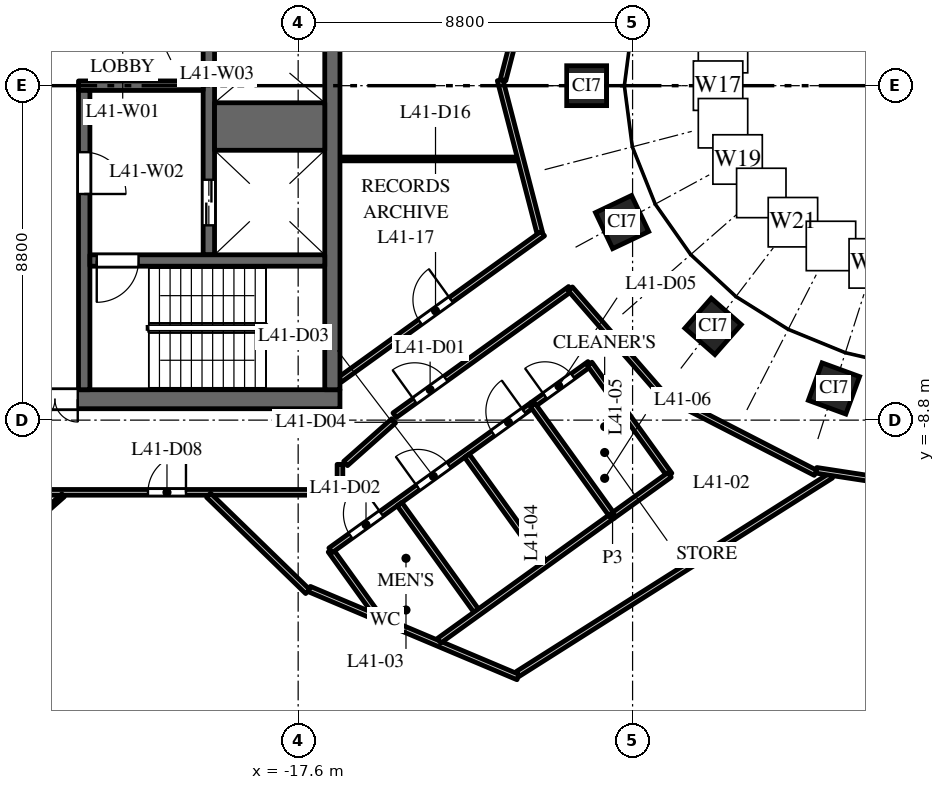
"""IFC4 building model, lengths in metres.
Left out: names, types, materials, properties, quantities, classifications, styles, units other than length and angle.
Written with IfcOpenShell. Run it as: python <this file> out.ifc"""

import sys

from ifc_helpers import new_model, si_unit, direction, frame, frame_2d, origin, origin_2d, place, context, subcontext, project, spatial, rectangle, extrude, element, fill, save


model = new_model("IFC4")
c1 = context("Model", 3, precision=1e-05, world=origin(), true_north=direction((0.0, 1.0)))
c2 = subcontext(c1, "Body", "Model", "MODEL_VIEW")
j1 = project(units=[si_unit("LENGTHUNIT", "METRE"), si_unit("PLANEANGLEUNIT", "RADIAN")], contexts=[c1])
p1 = place(None, origin())
s1 = spatial("IfcSite", under=j1, at=p1, CompositionType="ELEMENT")
p2 = place(p1, origin())
s2 = spatial("IfcBuilding", under=s1, at=p2, CompositionType="ELEMENT")
p3 = place(p2, frame((0.0, 0.0, 178.0)))
s3 = spatial("IfcBuildingStorey", under=s2, at=p3, CompositionType="ELEMENT", Elevation=178.0)
for number, where, z_axis, x_axis in (
    (1, (-10.008, 0.0, 0.0), (0.0, 0.0, 1.0), (0.0, -1.0, 0.0)),
    (2, (-9.076, -3.588, 0.0), (0.0, 0.0, 1.0), (0.429, -0.903, 0.0)),
    (3, (-6.682, -6.334, 0.0), (0.0, 0.0, 1.0), (0.751, -0.66, 0.0)),
    (4, (-3.501, -7.967, 0.0), (0.0, 0.0, 1.0), (0.939, -0.344, 0.0)),
):
    element("IfcColumn", number, at=place(p3, frame(where, z_axis=z_axis, x_axis=x_axis)), inside=s3, PredefinedType="COLUMN", context=c2, shape_type="SweptSolid", body=[
        extrude(rectangle(XDim=1.05, YDim=1.05, at=origin_2d()), origin(), (0.0, 0.0, 1.0), 4.0),
    ])
p4 = place(p3, frame((-16.5, -8.25, 0.0), z_axis=(0.0, 0.0, 1.0), x_axis=(-1.0, 0.0, 0.0)))
e5 = element("IfcWall", 5, at=p4, inside=s3, PredefinedType="SHEAR", context=c2, shape_type="SweptSolid", body=[
    extrude(rectangle(XDim=15.0, YDim=0.5, at=frame_2d((7.5, 0.0))), origin(), (0.0, 0.0, 1.0), 3.7),
])
p5 = place(p4, frame((6.9, 0.0, 0.0)))
e6 = element("IfcOpeningElement", 6, at=p5, cuts=e5, PredefinedType="OPENING", context=c2, shape_type="SweptSolid", body=[
    extrude(rectangle(XDim=1.2, YDim=2.1, at=frame_2d((0.6, 1.05))), frame((0.0, 0.26, 0.0), z_axis=(0.0, -1.0, 0.0), x_axis=(1.0, 0.0, 0.0)), (0.0, 0.0, 1.0), 0.52),
])
p6 = place(p4, frame((12.95, 0.0, 0.0)))
e7 = element("IfcOpeningElement", 7, at=p6, cuts=e5, PredefinedType="OPENING", context=c2, shape_type="SweptSolid", body=[
    extrude(rectangle(XDim=0.9, YDim=2.1, at=frame_2d((0.45, 1.05))), frame((0.0, 0.26, 0.0), z_axis=(0.0, -1.0, 0.0), x_axis=(1.0, 0.0, 0.0)), (0.0, 0.0, 1.0), 0.52),
])
p7 = place(p3, frame((-19.95, -4.45, 0.0), z_axis=(0.0, 0.0, 1.0), x_axis=(0.0, 1.0, 0.0)))
e8 = element("IfcWall", 8, at=p7, inside=s3, PredefinedType="SHEAR", context=c2, shape_type="SweptSolid", body=[
    extrude(rectangle(XDim=8.9, YDim=0.3, at=frame_2d((4.45, 0.0))), origin(), (0.0, 0.0, 1.0), 3.7),
])
p8 = place(p7, frame((0.775, 0.0, 0.0)))
e9 = element("IfcOpeningElement", 9, at=p8, cuts=e8, PredefinedType="OPENING", context=c2, shape_type="SweptSolid", body=[
    extrude(rectangle(XDim=1.2, YDim=2.1, at=frame_2d((0.6, 1.05))), frame((0.0, 0.16, 0.0), z_axis=(0.0, -1.0, 0.0), x_axis=(1.0, 0.0, 0.0)), (0.0, 0.0, 1.0), 0.32),
])
p9 = place(p7, frame((7.25, 0.0, 0.0)))
e10 = element("IfcOpeningElement", 10, at=p9, cuts=e8, PredefinedType="OPENING", context=c2, shape_type="SweptSolid", body=[
    extrude(rectangle(XDim=1.1, YDim=2.1, at=frame_2d((0.55, 1.05))), frame((0.0, 0.16, 0.0), z_axis=(0.0, -1.0, 0.0), x_axis=(1.0, 0.0, 0.0)), (0.0, 0.0, 1.0), 0.32),
])
p10 = place(p3, frame((-20.1, 0.0, 0.0), z_axis=(0.0, 0.0, 1.0), x_axis=(-1.0, 0.0, 0.0)))
e11 = element("IfcWall", 11, at=p10, inside=s3, PredefinedType="SHEAR", context=c2, shape_type="SweptSolid", body=[
    extrude(rectangle(XDim=3.28, YDim=0.25, at=frame_2d((1.64, 0.0))), origin(), (0.0, 0.0, 1.0), 3.7),
])
p11 = place(p3, frame((-16.7, -8.0, 0.0), z_axis=(0.0, 0.0, 1.0), x_axis=(0.0, 1.0, 0.0)))
e12 = element("IfcWall", 12, at=p11, inside=s3, PredefinedType="SHEAR", context=c2, shape_type="SweptSolid", body=[
    extrude(rectangle(XDim=16.0, YDim=0.4, at=frame_2d((8.0, 0.0))), origin(), (0.0, 0.0, 1.0), 3.7),
])
p12 = place(p3, frame((-16.9, -1.075, 0.0), z_axis=(0.0, 0.0, 1.0), x_axis=(-1.0, 0.0, 0.0)))
e13 = element("IfcWall", 13, at=p12, inside=s3, PredefinedType="SHEAR", context=c2, shape_type="SweptSolid", body=[
    extrude(rectangle(XDim=2.9, YDim=1.25, at=frame_2d((1.45, 0.0))), origin(), (0.0, 0.0, 1.0), 3.7),
])
p13 = place(p3, frame((-23.23, -8.0, 0.0), z_axis=(0.0, 0.0, 1.0), x_axis=(0.0, 1.0, 0.0)))
e14 = element("IfcWall", 14, at=p13, inside=s3, PredefinedType="SHEAR", context=c2, shape_type="SweptSolid", body=[
    extrude(rectangle(XDim=7.875, YDim=0.3, at=frame_2d((3.938, 0.0))), origin(), (0.0, 0.0, 1.0), 3.7),
])
p14 = place(p13, frame((5.15, 0.0, 0.0)))
e15 = element("IfcOpeningElement", 15, at=p14, cuts=e14, PredefinedType="OPENING", context=c2, shape_type="SweptSolid", body=[
    extrude(rectangle(XDim=1.1, YDim=2.1, at=frame_2d((0.55, 1.05))), frame((0.0, 0.16, 0.0), z_axis=(0.0, -1.0, 0.0), x_axis=(1.0, 0.0, 0.0)), (0.0, 0.0, 1.0), 0.32),
])
p15 = place(p3, frame((-16.9, -4.6, 0.0), z_axis=(0.0, 0.0, 1.0), x_axis=(-1.0, 0.0, 0.0)))
e16 = element("IfcWall", 16, at=p15, inside=s3, PredefinedType="SHEAR", context=c2, shape_type="SweptSolid", body=[
    extrude(rectangle(XDim=6.18, YDim=0.3, at=frame_2d((3.09, 0.0))), origin(), (0.0, 0.0, 1.0), 3.7),
])
p16 = place(p15, frame((4.9, 0.0, 0.0)))
e17 = element("IfcOpeningElement", 17, at=p16, cuts=e16, PredefinedType="OPENING", context=c2, shape_type="SweptSolid", body=[
    extrude(rectangle(XDim=1.1, YDim=2.1, at=frame_2d((0.55, 1.05))), frame((0.0, 0.16, 0.0), z_axis=(0.0, -1.0, 0.0), x_axis=(1.0, 0.0, 0.0)), (0.0, 0.0, 1.0), 0.32),
])
p17 = place(p3, frame((-31.5, -10.7, 0.0), z_axis=(0.0, 0.0, 1.0), x_axis=(1.0, 0.0, 0.0)))
e18 = element("IfcWall", 18, at=p17, inside=s3, PredefinedType="PARTITIONING", context=c2, shape_type="SweptSolid", body=[
    extrude(rectangle(XDim=15.0, YDim=0.15, at=frame_2d((7.5, 0.0))), origin(), (0.0, 0.0, 1.0), 3.1),
])
p18 = place(p17, frame((5.15, 0.0, 0.0)))
e19 = element("IfcOpeningElement", 19, at=p18, cuts=e18, PredefinedType="OPENING", context=c2, shape_type="SweptSolid", body=[
    extrude(rectangle(XDim=1.0, YDim=2.1, at=frame_2d((0.5, 1.05))), frame((0.0, 0.085, 0.0), z_axis=(0.0, -1.0, 0.0), x_axis=(1.0, 0.0, 0.0)), (0.0, 0.0, 1.0), 0.17),
])
p19 = place(p17, frame((9.948, 0.0, 0.0)))
e20 = element("IfcOpeningElement", 20, at=p19, cuts=e18, PredefinedType="OPENING", context=c2, shape_type="SweptSolid", body=[
    extrude(rectangle(XDim=1.0, YDim=2.1, at=frame_2d((0.5, 1.05))), frame((0.0, 0.085, 0.0), z_axis=(0.0, -1.0, 0.0), x_axis=(1.0, 0.0, 0.0)), (0.0, 0.0, 1.0), 0.17),
])
p20 = place(p3, frame((-29.569, -15.895, 0.0), z_axis=(0.0, 0.0, 1.0), x_axis=(0.748985701008, 0.662586160198, 0.0)))
e21 = element("IfcWall", 21, at=p20, inside=s3, PredefinedType="PARTITIONING", context=c2, shape_type="SweptSolid", body=[
    extrude(rectangle(XDim=7.723, YDim=0.1, at=frame_2d((3.861, 0.0))), origin(), (0.0, 0.0, 1.0), 2.9),
])
p21 = place(p3, frame((-19.957, -10.778, 0.0), z_axis=(0.0, 0.0, 1.0), x_axis=(0.717213172792, -0.696853833148, 0.0)))
e22 = element("IfcWall", 22, at=p21, inside=s3, PredefinedType="PARTITIONING", context=c2, shape_type="SweptSolid", body=[
    extrude(rectangle(XDim=3.634, YDim=0.15, at=frame_2d((1.817, 0.0))), origin(), (0.0, 0.0, 1.0), 2.75),
])
p22 = place(p3, frame((-17.308, -13.244, 0.0), z_axis=(0.0, 0.0, 1.0), x_axis=(0.921372407205, -0.388680958167, 0.0)))
e23 = element("IfcWall", 23, at=p22, inside=s3, PredefinedType="PARTITIONING", context=c2, shape_type="SweptSolid", body=[
    extrude(rectangle(XDim=5.964, YDim=0.15, at=frame_2d((2.982, 0.0))), origin(), (0.0, 0.0, 1.0), 2.85),
])
p23 = place(p3, frame((-16.748, -12.226, 0.0), z_axis=(0.0, 0.0, 1.0), x_axis=(0.584075144399, -0.811699590794, 0.0)))
e24 = element("IfcWall", 24, at=p23, inside=s3, PredefinedType="PARTITIONING", context=c2, shape_type="SweptSolid", body=[
    extrude(rectangle(XDim=2.073, YDim=0.15, at=frame_2d((1.037, 0.0))), origin(), (0.0, 0.0, 1.0), 3.7),
])
p24 = place(p3, frame((-16.748, -12.226, 0.0), z_axis=(0.0, 0.0, 1.0), x_axis=(0.811671429569, 0.584114278563, 0.0)))
e25 = element("IfcWall", 25, at=p24, inside=s3, PredefinedType="PARTITIONING", context=c2, shape_type="SweptSolid", body=[
    extrude(rectangle(XDim=6.552, YDim=0.15, at=frame_2d((3.276, 0.0))), origin(), (0.0, 0.0, 1.0), 3.7),
])
p25 = place(p24, frame((0.65, 0.0, 0.0)))
e26 = element("IfcOpeningElement", 26, at=p25, cuts=e25, PredefinedType="OPENING", context=c2, shape_type="SweptSolid", body=[
    extrude(rectangle(XDim=1.0, YDim=2.1, at=frame_2d((0.5, 1.05))), frame((0.0, 0.085, 0.0), z_axis=(0.0, -1.0, 0.0), x_axis=(1.0, 0.0, 0.0)), (0.0, 0.0, 1.0), 0.17),
])
p26 = place(p24, frame((2.833, 0.0, 0.0)))
e27 = element("IfcOpeningElement", 27, at=p26, cuts=e25, PredefinedType="OPENING", context=c2, shape_type="SweptSolid", body=[
    extrude(rectangle(XDim=1.0, YDim=2.1, at=frame_2d((0.5, 1.05))), frame((0.0, 0.085, 0.0), z_axis=(0.0, -1.0, 0.0), x_axis=(1.0, 0.0, 0.0)), (0.0, 0.0, 1.0), 0.17),
])
p27 = place(p24, frame((5.268, 0.0, 0.0)))
e28 = element("IfcOpeningElement", 28, at=p27, cuts=e25, PredefinedType="OPENING", context=c2, shape_type="SweptSolid", body=[
    extrude(rectangle(XDim=1.0, YDim=2.1, at=frame_2d((0.5, 1.05))), frame((0.0, 0.085, 0.0), z_axis=(0.0, -1.0, 0.0), x_axis=(1.0, 0.0, 0.0)), (0.0, 0.0, 1.0), 0.17),
])
p28 = place(p3, frame((-16.5, -10.7, 0.0), z_axis=(0.0, 0.0, 1.0), x_axis=(0.0, 1.0, 0.0)))
e29 = element("IfcWall", 29, at=p28, inside=s3, PredefinedType="PARTITIONING", context=c2, shape_type="SweptSolid", body=[
    extrude(rectangle(XDim=0.736, YDim=0.15, at=frame_2d((0.368, 0.0))), origin(), (0.0, 0.0, 1.0), 3.7),
])
p29 = place(p3, frame((-16.5, -1.928, 0.0), z_axis=(0.0, 0.0, 1.0), x_axis=(1.0, 0.0, 0.0)))
e30 = element("IfcWall", 30, at=p29, inside=s3, PredefinedType="PARTITIONING", context=c2, shape_type="SweptSolid", body=[
    extrude(rectangle(XDim=4.672, YDim=0.1, at=frame_2d((2.336, 0.0))), origin(), (0.0, 0.0, 1.0), 3.7),
])
p30 = place(p3, frame((-16.5, -7.735, 0.0), z_axis=(0.0, 0.0, 1.0), x_axis=(0.811616692984, 0.584190331715, 0.0)))
e31 = element("IfcWall", 31, at=p30, inside=s3, PredefinedType="PARTITIONING", context=c2, shape_type="SweptSolid", body=[
    extrude(rectangle(XDim=6.578, YDim=0.15, at=frame_2d((3.289, 0.0))), origin(), (0.0, 0.0, 1.0), 3.7),
])
p31 = place(p30, frame((2.598, 0.0, 0.0)))
e32 = element("IfcOpeningElement", 32, at=p31, cuts=e31, PredefinedType="OPENING", context=c2, shape_type="SweptSolid", body=[
    extrude(rectangle(XDim=1.0, YDim=2.1, at=frame_2d((0.5, 1.05))), frame((0.0, 0.085, 0.0), z_axis=(0.0, -1.0, 0.0), x_axis=(1.0, 0.0, 0.0)), (0.0, 0.0, 1.0), 0.17),
])
p32 = place(p3, frame((-15.061, -8.671, 0.0), z_axis=(0.0, 0.0, 1.0), x_axis=(0.811697765448, 0.584077681106, 0.0)))
e33 = element("IfcWall", 33, at=p32, inside=s3, PredefinedType="PARTITIONING", context=c2, shape_type="SweptSolid", body=[
    extrude(rectangle(XDim=5.694, YDim=0.15, at=frame_2d((2.847, 0.0))), origin(), (0.0, 0.0, 1.0), 3.7),
])
p33 = place(p32, frame((0.65, 0.0, 0.0)))
e34 = element("IfcOpeningElement", 34, at=p33, cuts=e33, PredefinedType="OPENING", context=c2, shape_type="SweptSolid", body=[
    extrude(rectangle(XDim=1.0, YDim=2.1, at=frame_2d((0.5, 1.05))), frame((0.0, 0.085, 0.0), z_axis=(0.0, -1.0, 0.0), x_axis=(1.0, 0.0, 0.0)), (0.0, 0.0, 1.0), 0.17),
])
p34 = place(p3, frame((-14.932, -11.011, 0.0), z_axis=(0.0, 0.0, 1.0), x_axis=(0.584086569898, -0.811691369219, 0.0)))
e35 = element("IfcWall", 35, at=p34, inside=s3, PredefinedType="PARTITIONING", context=c2, shape_type="SweptSolid", body=[
    extrude(rectangle(XDim=3.45, YDim=0.15, at=frame_2d((1.725, 0.0))), origin(), (0.0, 0.0, 1.0), 3.7),
])
p35 = place(p3, frame((-13.891, -14.605, 0.0), z_axis=(0.0, 0.0, 1.0), x_axis=(0.811586224106, 0.584232659855, 0.0)))
e36 = element("IfcWall", 36, at=p35, inside=s3, PredefinedType="PARTITIONING", context=c2, shape_type="SweptSolid", body=[
    extrude(rectangle(XDim=5.623, YDim=0.15, at=frame_2d((2.811, 0.0))), origin(), (0.0, 0.0, 1.0), 2.85),
])
p36 = place(p3, frame((-13.159, -9.736, 0.0), z_axis=(0.0, 0.0, 1.0), x_axis=(0.584120124494, -0.811667222549, 0.0)))
e37 = element("IfcWall", 37, at=p36, inside=s3, PredefinedType="PARTITIONING", context=c2, shape_type="SweptSolid", body=[
    extrude(rectangle(XDim=3.449, YDim=0.15, at=frame_2d((1.725, 0.0))), origin(), (0.0, 0.0, 1.0), 3.7),
])
p37 = place(p3, frame((-12.286, 0.149, 0.0), z_axis=(0.0, 0.0, 1.0), x_axis=(0.250998973278, -0.96798735292, 0.0)))
e38 = element("IfcWall", 38, at=p37, inside=s3, PredefinedType="PARTITIONING", context=c2, shape_type="SweptSolid", body=[
    extrude(rectangle(XDim=4.143, YDim=0.15, at=frame_2d((2.071, 0.0))), origin(), (0.0, 0.0, 1.0), 3.7),
])
p38 = place(p3, frame((-12.208, 0.149, 0.0), z_axis=(0.0, 0.0, 1.0), x_axis=(0.250840636591, 0.968028395779, 0.0)))
e39 = element("IfcWall", 39, at=p38, inside=s3, PredefinedType="PARTITIONING", context=c2, shape_type="SweptSolid", body=[
    extrude(rectangle(XDim=3.835, YDim=0.15, at=frame_2d((1.917, 0.0))), origin(), (0.0, 0.0, 1.0), 3.7),
])
p39 = place(p3, frame((-11.82, -15.478, 0.0), z_axis=(0.0, 0.0, 1.0), x_axis=(0.844868091448, 0.534974679825, 0.0)))
e40 = element("IfcWall", 40, at=p39, inside=s3, PredefinedType="PARTITIONING", context=c2, shape_type="SweptSolid", body=[
    extrude(rectangle(XDim=9.756, YDim=0.15, at=frame_2d((4.878, 0.0))), origin(), (0.0, 0.0, 1.0), 2.85),
])
p40 = place(p3, frame((-11.43, -8.399, 0.0), z_axis=(0.0, 0.0, 1.0), x_axis=(0.811827466755, 0.583897391861, 0.0)))
e41 = element("IfcWall", 41, at=p40, inside=s3, PredefinedType="PARTITIONING", context=c2, shape_type="SweptSolid", body=[
    extrude(rectangle(XDim=1.848, YDim=0.15, at=frame_2d((0.924, 0.0))), origin(), (0.0, 0.0, 1.0), 3.7),
])
p41 = place(p40, frame((0.4, 0.0, 0.0)))
e42 = element("IfcOpeningElement", 42, at=p41, cuts=e41, PredefinedType="OPENING", context=c2, shape_type="SweptSolid", body=[
    extrude(rectangle(XDim=0.9, YDim=2.1, at=frame_2d((0.45, 1.05))), frame((0.0, 0.085, 0.0), z_axis=(0.0, -1.0, 0.0), x_axis=(1.0, 0.0, 0.0)), (0.0, 0.0, 1.0), 0.17),
])
p42 = place(p3, frame((-11.43, -8.399, 0.0), z_axis=(0.0, 0.0, 1.0), x_axis=(0.584140362249, -0.811652657971, 0.0)))
e43 = element("IfcWall", 43, at=p42, inside=s3, PredefinedType="PARTITIONING", context=c2, shape_type="SweptSolid", body=[
    extrude(rectangle(XDim=3.6, YDim=0.15, at=frame_2d((1.8, 0.0))), origin(), (0.0, 0.0, 1.0), 2.85),
])
p43 = place(p3, frame((-10.439, -5.345, 0.0), z_axis=(0.0, 0.0, 1.0), x_axis=(0.656405809938, -0.754407988213, 0.0)))
e44 = element("IfcWall", 44, at=p43, inside=s3, PredefinedType="PARTITIONING", context=c2, shape_type="SweptSolid", body=[
    extrude(rectangle(XDim=3.859, YDim=0.15, at=frame_2d((1.929, 0.0))), origin(), (0.0, 0.0, 1.0), 2.75),
])
p44 = place(p3, frame((-9.93, -7.32, 0.0), z_axis=(0.0, 0.0, 1.0), x_axis=(0.584172514953, -0.811629516944, 0.0)))
e45 = element("IfcWall", 45, at=p44, inside=s3, PredefinedType="PARTITIONING", context=c2, shape_type="SweptSolid", body=[
    extrude(rectangle(XDim=3.6, YDim=0.15, at=frame_2d((1.8, 0.0))), origin(), (0.0, 0.0, 1.0), 2.85),
])
p45 = place(p3, frame((-9.327, -11.321, 0.0), z_axis=(0.0, 0.0, 1.0), x_axis=(0.811514298965, 0.584332561625, 0.0)))
e46 = element("IfcWall", 46, at=p45, inside=s3, PredefinedType="PARTITIONING", context=c2, shape_type="SweptSolid", body=[
    extrude(rectangle(XDim=1.848, YDim=0.15, at=frame_2d((0.924, 0.0))), origin(), (0.0, 0.0, 1.0), 2.85),
])
p46 = place(p3, frame((-7.859, -8.196, 0.0), z_axis=(0.0, 0.0, 1.0), x_axis=(0.889405670308, -0.457118752213, 0.0)))
e47 = element("IfcWall", 47, at=p46, inside=s3, PredefinedType="PARTITIONING", context=c2, shape_type="SweptSolid", body=[
    extrude(rectangle(XDim=4.355, YDim=0.15, at=frame_2d((2.178, 0.0))), origin(), (0.0, 0.0, 1.0), 2.85),
])
p47 = place(p3, frame((-3.964, -10.121, 0.0), z_axis=(0.0, 0.0, 1.0), x_axis=(0.988463044045, -0.151462241359, 0.0)))
e48 = element("IfcWall", 48, at=p47, inside=s3, PredefinedType="PARTITIONING", context=c2, shape_type="SweptSolid", body=[
    extrude(rectangle(XDim=4.225, YDim=0.15, at=frame_2d((2.112, 0.0))), origin(), (0.0, 0.0, 1.0), 2.85),
])
p48 = place(p3, frame((-15.087, -8.819, 0.0), z_axis=(0.0, 0.0, 1.0), x_axis=(-0.747926695066, -0.663781333579, 0.0)))
e49 = element("IfcWall", 49, at=p48, inside=s3, PredefinedType="PARTITIONING", context=c2, shape_type="SweptSolid", body=[
    extrude(rectangle(XDim=1.691, YDim=0.15, at=frame_2d((0.846, 0.0))), origin(), (0.0, 0.0, 1.0), 3.7),
])
p49 = place(p8, origin())
e50 = element("IfcDoor", 50, at=p49, inside=s3, OperationType="DOUBLE_DOOR_SLIDING", PredefinedType="DOOR", context=c2, shape_type="SweptSolid", body=[
    extrude(rectangle(XDim=1.2, YDim=2.1, at=frame_2d((0.6, 1.05))), frame((0.0, 0.025, 0.0), z_axis=(0.0, -1.0, 0.0), x_axis=(1.0, 0.0, 0.0)), (0.0, 0.0, 1.0), 0.05),
])
fill(e9, e50)
p50 = place(p16, origin())
e51 = element("IfcDoor", 51, at=p50, inside=s3, OperationType="SINGLE_SWING_LEFT", PredefinedType="DOOR", context=c2, shape_type="SweptSolid", body=[
    extrude(rectangle(XDim=1.1, YDim=2.1, at=frame_2d((0.55, 1.05))), frame((0.0, 0.025, 0.0), z_axis=(0.0, -1.0, 0.0), x_axis=(1.0, 0.0, 0.0)), (0.0, 0.0, 1.0), 0.05),
])
fill(e17, e51)
p51 = place(p14, origin())
e52 = element("IfcDoor", 52, at=p51, inside=s3, OperationType="SINGLE_SWING_LEFT", PredefinedType="DOOR", context=c2, shape_type="SweptSolid", body=[
    extrude(rectangle(XDim=1.1, YDim=2.1, at=frame_2d((0.55, 1.05))), frame((0.0, 0.025, 0.0), z_axis=(0.0, -1.0, 0.0), x_axis=(1.0, 0.0, 0.0)), (0.0, 0.0, 1.0), 0.05),
])
fill(e15, e52)
p52 = place(p5, origin())
e53 = element("IfcDoor", 53, at=p52, inside=s3, OperationType="DOUBLE_DOOR_DOUBLE_SWING", PredefinedType="DOOR", context=c2, shape_type="SweptSolid", body=[
    extrude(rectangle(XDim=1.2, YDim=2.1, at=frame_2d((0.6, 1.05))), frame((0.0, 0.025, 0.0), z_axis=(0.0, -1.0, 0.0), x_axis=(1.0, 0.0, 0.0)), (0.0, 0.0, 1.0), 0.05),
])
fill(e6, e53)
p53 = place(p33, origin())
e54 = element("IfcDoor", 54, at=p53, inside=s3, OperationType="SINGLE_SWING_LEFT", PredefinedType="DOOR", context=c2, shape_type="SweptSolid", body=[
    extrude(rectangle(XDim=1.0, YDim=2.1, at=frame_2d((0.5, 1.05))), frame((0.0, 0.025, 0.0), z_axis=(0.0, -1.0, 0.0), x_axis=(1.0, 0.0, 0.0)), (0.0, 0.0, 1.0), 0.05),
])
fill(e34, e54)
p54 = place(p25, origin())
e55 = element("IfcDoor", 55, at=p54, inside=s3, OperationType="SINGLE_SWING_RIGHT", PredefinedType="DOOR", context=c2, shape_type="SweptSolid", body=[
    extrude(rectangle(XDim=1.0, YDim=2.1, at=frame_2d((0.5, 1.05))), frame((0.0, 0.025, 0.0), z_axis=(0.0, -1.0, 0.0), x_axis=(1.0, 0.0, 0.0)), (0.0, 0.0, 1.0), 0.05),
])
fill(e26, e55)
p55 = place(p26, origin())
e56 = element("IfcDoor", 56, at=p55, inside=s3, OperationType="SINGLE_SWING_LEFT", PredefinedType="DOOR", context=c2, shape_type="SweptSolid", body=[
    extrude(rectangle(XDim=1.0, YDim=2.1, at=frame_2d((0.5, 1.05))), frame((0.0, 0.025, 0.0), z_axis=(0.0, -1.0, 0.0), x_axis=(1.0, 0.0, 0.0)), (0.0, 0.0, 1.0), 0.05),
])
fill(e27, e56)
p56 = place(p27, origin())
e57 = element("IfcDoor", 57, at=p56, inside=s3, OperationType="SINGLE_SWING_RIGHT", PredefinedType="DOOR", context=c2, shape_type="SweptSolid", body=[
    extrude(rectangle(XDim=1.0, YDim=2.1, at=frame_2d((0.5, 1.05))), frame((0.0, 0.025, 0.0), z_axis=(0.0, -1.0, 0.0), x_axis=(1.0, 0.0, 0.0)), (0.0, 0.0, 1.0), 0.05),
])
fill(e28, e57)
p57 = place(p41, origin())
e58 = element("IfcDoor", 58, at=p57, inside=s3, OperationType="SINGLE_SWING_LEFT", PredefinedType="DOOR", context=c2, shape_type="SweptSolid", body=[
    extrude(rectangle(XDim=0.9, YDim=2.1, at=frame_2d((0.45, 1.05))), frame((0.0, 0.025, 0.0), z_axis=(0.0, -1.0, 0.0), x_axis=(1.0, 0.0, 0.0)), (0.0, 0.0, 1.0), 0.05),
])
fill(e42, e58)
p58 = place(p19, origin())
e59 = element("IfcDoor", 59, at=p58, inside=s3, OperationType="SINGLE_SWING_RIGHT", PredefinedType="DOOR", context=c2, shape_type="SweptSolid", body=[
    extrude(rectangle(XDim=1.0, YDim=2.1, at=frame_2d((0.5, 1.05))), frame((0.0, 0.025, 0.0), z_axis=(0.0, -1.0, 0.0), x_axis=(1.0, 0.0, 0.0)), (0.0, 0.0, 1.0), 0.05),
])
fill(e20, e59)
p59 = place(p31, origin())
e60 = element("IfcDoor", 60, at=p59, inside=s3, OperationType="SINGLE_SWING_RIGHT", PredefinedType="DOOR", context=c2, shape_type="SweptSolid", body=[
    extrude(rectangle(XDim=1.0, YDim=2.1, at=frame_2d((0.5, 1.05))), frame((0.0, 0.025, 0.0), z_axis=(0.0, -1.0, 0.0), x_axis=(1.0, 0.0, 0.0)), (0.0, 0.0, 1.0), 0.05),
])
fill(e32, e60)
save(model, sys.argv[1])
